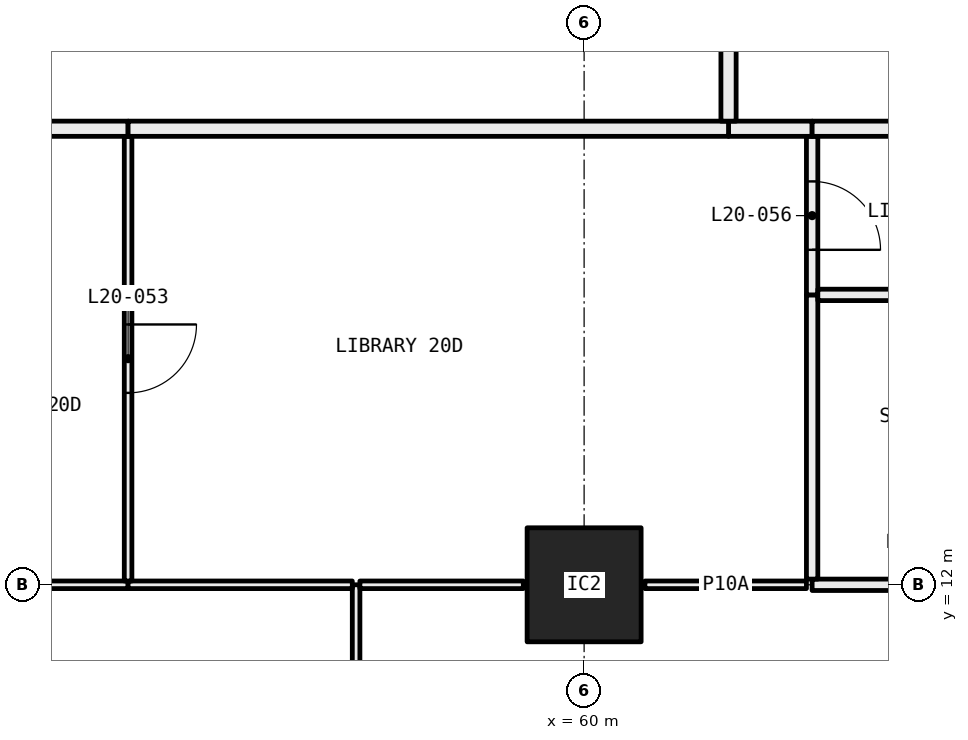
"""IFC4 building model, lengths in metres.
Left out: names, types, materials, properties, quantities, classifications, styles, units other than length and angle.
Written with IfcOpenShell. Run it as: python <this file> out.ifc"""

import sys

from ifc_helpers import new_model, si_unit, direction, frame, frame_2d, origin, origin_2d, place, context, subcontext, project, spatial, rectangle, hollow_rectangle, extrude, element, fill, save


model = new_model("IFC4")
c1 = context("Model", 3, precision=1e-05, world=origin(), true_north=direction((0.0, 1.0)))
c2 = subcontext(c1, "Body", "Model", "MODEL_VIEW")
j1 = project(units=[si_unit("LENGTHUNIT", "METRE"), si_unit("PLANEANGLEUNIT", "RADIAN")], contexts=[c1])
p1 = place(None, origin())
s1 = spatial("IfcSite", under=j1, at=p1, CompositionType="ELEMENT")
p2 = place(p1, origin())
s2 = spatial("IfcBuilding", under=s1, at=p2, CompositionType="ELEMENT")
p3 = place(p2, frame((0.0, 0.0, 81.75)))
s3 = spatial("IfcBuildingStorey", under=s2, at=p3, CompositionType="ELEMENT", Elevation=81.75)
p4 = place(p3, frame((60.0, 12.0, 0.0), z_axis=(0.0, 0.0, 1.0), x_axis=(1.0, 0.0, 0.0)))
e1 = element("IfcColumn", 1, at=p4, inside=s3, PredefinedType="COLUMN", context=c2, shape_type="SweptSolid", body=[
    extrude(hollow_rectangle(XDim=1.5, YDim=1.5, WallThickness=0.065, at=origin_2d()), origin(), (0.0, 0.0, 1.0), 3.05),
])
p5 = place(p3, frame((57.0, 6.05, 0.0), z_axis=(0.0, 0.0, 1.0), x_axis=(0.0, 1.0, 0.0)))
e2 = element("IfcWall", 2, at=p5, inside=s3, PredefinedType="PARTITIONING", context=c2, shape_type="SweptSolid", body=[
    extrude(rectangle(XDim=5.95, YDim=0.1, at=frame_2d((2.975, 0.0))), origin(), (0.0, 0.0, 1.0), 2.45),
])
p6 = place(p5, frame((2.525, 0.0, 0.0)))
e3 = element("IfcOpeningElement", 3, at=p6, cuts=e2, PredefinedType="OPENING", context=c2, shape_type="SweptSolid", body=[
    extrude(rectangle(XDim=0.9, YDim=2.1, at=frame_2d((0.45, 1.05))), frame((0.0, 0.06, 0.0), z_axis=(0.0, -1.0, 0.0), x_axis=(1.0, 0.0, 0.0)), (0.0, 0.0, 1.0), 0.12),
])
p7 = place(p3, frame((54.0, 12.0, 0.0), z_axis=(0.0, 0.0, 1.0), x_axis=(-1.0, 0.0, 0.0)))
e4 = element("IfcWall", 4, at=p7, inside=s3, PredefinedType="PARTITIONING", context=c2, shape_type="SweptSolid", body=[
    extrude(rectangle(XDim=4.5, YDim=0.1, at=frame_2d((2.25, 0.0))), origin(), (0.0, 0.0, 1.0), 2.45),
])
p8 = place(p7, frame((1.8, 0.0, 0.0)))
e5 = element("IfcOpeningElement", 5, at=p8, cuts=e4, PredefinedType="OPENING", context=c2, shape_type="SweptSolid", body=[
    extrude(rectangle(XDim=0.9, YDim=2.1, at=frame_2d((0.45, 1.05))), frame((0.0, 0.06, 0.0), z_axis=(0.0, -1.0, 0.0), x_axis=(1.0, 0.0, 0.0)), (0.0, 0.0, 1.0), 0.12),
])
p9 = place(p3, frame((56.95, 12.0, 0.0), z_axis=(0.0, 0.0, 1.0), x_axis=(-1.0, 0.0, 0.0)))
e6 = element("IfcWall", 6, at=p9, inside=s3, PredefinedType="PARTITIONING", context=c2, shape_type="SweptSolid", body=[
    extrude(rectangle(XDim=2.95, YDim=0.1, at=frame_2d((1.475, 0.0))), origin(), (0.0, 0.0, 1.0), 2.45),
])
p10 = place(p3, frame((59.2, 12.0, 0.0), z_axis=(0.0, 0.0, 1.0), x_axis=(-1.0, 0.0, 0.0)))
e7 = element("IfcWall", 7, at=p10, inside=s3, PredefinedType="PARTITIONING", context=c2, shape_type="SweptSolid", body=[
    extrude(rectangle(XDim=2.15, YDim=0.1, at=frame_2d((1.075, 0.0))), origin(), (0.0, 0.0, 1.0), 2.45),
])
p11 = place(p3, frame((62.925, 12.0, 0.0), z_axis=(0.0, 0.0, 1.0), x_axis=(-1.0, 0.0, 0.0)))
e8 = element("IfcWall", 8, at=p11, inside=s3, PredefinedType="PARTITIONING", context=c2, shape_type="SweptSolid", body=[
    extrude(rectangle(XDim=2.125, YDim=0.1, at=frame_2d((1.062, 0.0))), origin(), (0.0, 0.0, 1.0), 2.45),
])
p12 = place(p3, frame((66.0, 12.0, 0.0), z_axis=(0.0, 0.0, 1.0), x_axis=(-1.0, 0.0, 0.0)))
e9 = element("IfcWall", 9, at=p12, inside=s3, PredefinedType="PARTITIONING", context=c2, shape_type="SweptSolid", body=[
    extrude(rectangle(XDim=3.0, YDim=0.15, at=frame_2d((1.5, 0.0))), origin(), (0.0, 0.0, 1.0), 2.45),
])
p13 = place(p12, frame((1.05, 0.0, 0.0)))
e10 = element("IfcOpeningElement", 10, at=p13, cuts=e9, PredefinedType="OPENING", context=c2, shape_type="SweptSolid", body=[
    extrude(rectangle(XDim=0.9, YDim=2.1, at=frame_2d((0.45, 1.05))), frame((0.0, 0.085, 0.0), z_axis=(0.0, -1.0, 0.0), x_axis=(1.0, 0.0, 0.0)), (0.0, 0.0, 1.0), 0.17),
])
p14 = place(p3, frame((54.0, 12.05, 0.0), z_axis=(0.0, 0.0, 1.0), x_axis=(0.0, 1.0, 0.0)))
e11 = element("IfcWall", 11, at=p14, inside=s3, PredefinedType="PARTITIONING", context=c2, shape_type="SweptSolid", body=[
    extrude(rectangle(XDim=5.85, YDim=0.1, at=frame_2d((2.925, 0.0))), origin(), (0.0, 0.0, 1.0), 2.45),
])
p15 = place(p14, frame((2.475, 0.0, 0.0)))
e12 = element("IfcOpeningElement", 12, at=p15, cuts=e11, PredefinedType="OPENING", context=c2, shape_type="SweptSolid", body=[
    extrude(rectangle(XDim=0.9, YDim=2.1, at=frame_2d((0.45, 1.05))), frame((0.0, 0.06, 0.0), z_axis=(0.0, -1.0, 0.0), x_axis=(1.0, 0.0, 0.0)), (0.0, 0.0, 1.0), 0.12),
])
p16 = place(p3, frame((54.0, 18.0, 0.0), z_axis=(0.0, 0.0, 1.0), x_axis=(-1.0, 0.0, 0.0)))
e13 = element("IfcWall", 13, at=p16, inside=s3, PredefinedType="PARTITIONING", context=c2, shape_type="SweptSolid", body=[
    extrude(rectangle(XDim=4.5, YDim=0.2, at=frame_2d((2.25, 0.0))), origin(), (0.0, 0.0, 1.0), 3.05),
])
p17 = place(p16, frame((1.75, 0.0, 0.0)))
e14 = element("IfcOpeningElement", 14, at=p17, cuts=e13, PredefinedType="OPENING", context=c2, shape_type="SweptSolid", body=[
    extrude(rectangle(XDim=1.0, YDim=2.1, at=frame_2d((0.5, 1.05))), frame((0.0, 0.11, 0.0), z_axis=(0.0, -1.0, 0.0), x_axis=(1.0, 0.0, 0.0)), (0.0, 0.0, 1.0), 0.22),
])
p18 = place(p3, frame((63.0, 12.075, 0.0), z_axis=(0.0, 0.0, 1.0), x_axis=(0.0, 1.0, 0.0)))
e15 = element("IfcWall", 15, at=p18, inside=s3, PredefinedType="PARTITIONING", context=c2, shape_type="SweptSolid", body=[
    extrude(rectangle(XDim=3.739, YDim=0.15, at=frame_2d((1.87, 0.0))), origin(), (0.0, 0.0, 1.0), 2.45),
])
p19 = place(p3, frame((63.0, 15.814, 0.0), z_axis=(0.0, 0.0, 1.0), x_axis=(0.0, 1.0, 0.0)))
e16 = element("IfcWall", 16, at=p19, inside=s3, PredefinedType="PARTITIONING", context=c2, shape_type="SweptSolid", body=[
    extrude(rectangle(XDim=2.086, YDim=0.15, at=frame_2d((1.043, 0.0))), origin(), (0.0, 0.0, 1.0), 3.05),
])
p20 = place(p19, frame((0.593, 0.0, 0.0)))
e17 = element("IfcOpeningElement", 17, at=p20, cuts=e16, PredefinedType="OPENING", context=c2, shape_type="SweptSolid", body=[
    extrude(rectangle(XDim=0.9, YDim=2.1, at=frame_2d((0.45, 1.05))), frame((0.0, 0.085, 0.0), z_axis=(0.0, -1.0, 0.0), x_axis=(1.0, 0.0, 0.0)), (0.0, 0.0, 1.0), 0.17),
])
p21 = place(p3, frame((63.0, 18.0, 0.0), z_axis=(0.0, 0.0, 1.0), x_axis=(-1.0, 0.0, 0.0)))
e18 = element("IfcWall", 18, at=p21, inside=s3, PredefinedType="PARTITIONING", context=c2, shape_type="SweptSolid", body=[
    extrude(rectangle(XDim=1.1, YDim=0.2, at=frame_2d((0.55, 0.0))), origin(), (0.0, 0.0, 1.0), 3.05),
])
p22 = place(p3, frame((61.9, 18.0, 0.0), z_axis=(0.0, 0.0, 1.0), x_axis=(-1.0, 0.0, 0.0)))
e19 = element("IfcWall", 19, at=p22, inside=s3, PredefinedType="PARTITIONING", context=c2, shape_type="SweptSolid", body=[
    extrude(rectangle(XDim=7.9, YDim=0.2, at=frame_2d((3.95, 0.0))), origin(), (0.0, 0.0, 1.0), 3.05),
])
p23 = place(p3, frame((66.071, 15.814, 0.0), z_axis=(0.0, 0.0, 1.0), x_axis=(-1.0, 0.0, 0.0)))
e20 = element("IfcWall", 20, at=p23, inside=s3, PredefinedType="PARTITIONING", context=c2, shape_type="SweptSolid", body=[
    extrude(rectangle(XDim=2.996, YDim=0.15, at=frame_2d((1.498, 0.0))), origin(), (0.0, 0.0, 1.0), 3.05),
])
p24 = place(p3, frame((66.0, 18.0, 0.0), z_axis=(0.0, 0.0, 1.0), x_axis=(-1.0, 0.0, 0.0)))
e21 = element("IfcWall", 21, at=p24, inside=s3, PredefinedType="PARTITIONING", context=c2, shape_type="SweptSolid", body=[
    extrude(rectangle(XDim=3.0, YDim=0.2, at=frame_2d((1.5, 0.0))), origin(), (0.0, 0.0, 1.0), 3.05),
])
p25 = place(p3, frame((61.9, 22.5, 0.0), z_axis=(0.0, 0.0, 1.0), x_axis=(0.0, -1.0, 0.0)))
e22 = element("IfcWall", 22, at=p25, inside=s3, PredefinedType="PARTITIONING", context=c2, shape_type="SweptSolid", body=[
    extrude(rectangle(XDim=4.4, YDim=0.2, at=frame_2d((2.2, 0.0))), origin(), (0.0, 0.0, 1.0), 3.05),
])
p26 = place(p15, frame((0.9, 0.0, 0.0), x_axis=(-1.0, 0.0, 0.0)))
e23 = element("IfcDoor", 23, at=p26, inside=s3, OperationType="SINGLE_SWING_RIGHT", PredefinedType="DOOR", context=c2, shape_type="SweptSolid", body=[
    extrude(rectangle(XDim=0.9, YDim=2.1, at=frame_2d((0.45, 1.05))), frame((0.0, 0.025, 0.0), z_axis=(0.0, -1.0, 0.0), x_axis=(1.0, 0.0, 0.0)), (0.0, 0.0, 1.0), 0.05),
])
fill(e12, e23)
p27 = place(p20, frame((0.9, 0.0, 0.0), x_axis=(-1.0, 0.0, 0.0)))
e24 = element("IfcDoor", 24, at=p27, inside=s3, OperationType="SINGLE_SWING_LEFT", PredefinedType="DOOR", context=c2, shape_type="SweptSolid", body=[
    extrude(rectangle(XDim=0.9, YDim=2.1, at=frame_2d((0.45, 1.05))), frame((0.0, 0.025, 0.0), z_axis=(0.0, -1.0, 0.0), x_axis=(1.0, 0.0, 0.0)), (0.0, 0.0, 1.0), 0.05),
])
fill(e17, e24)
save(model, sys.argv[1])
